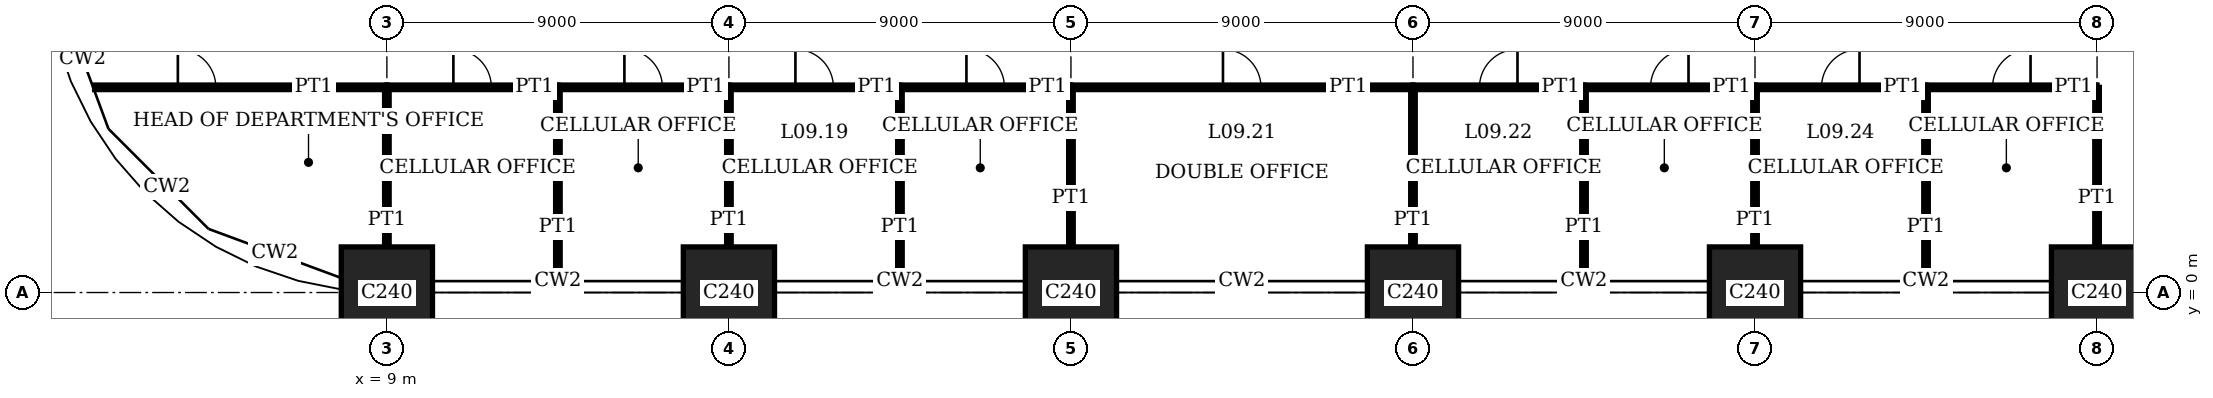
"""IFC4 building model, lengths in metres.
Left out: names, types, materials, properties, quantities, classifications, styles, units other than length and angle.
Written with IfcOpenShell. Run it as: python <this file> out.ifc"""

import sys

from ifc_helpers import new_model, si_unit, direction, frame, frame_2d, origin, origin_2d, place, context, subcontext, project, spatial, rectangle, extrude, element, fill, save


model = new_model("IFC4")
c1 = context("Model", 3, precision=1e-05, world=origin(), true_north=direction((0.0, 1.0)))
c2 = subcontext(c1, "Body", "Model", "MODEL_VIEW")
j1 = project(units=[si_unit("LENGTHUNIT", "METRE"), si_unit("PLANEANGLEUNIT", "RADIAN")], contexts=[c1])
p1 = place(None, origin())
s1 = spatial("IfcSite", under=j1, at=p1, CompositionType="ELEMENT")
p2 = place(p1, origin())
s2 = spatial("IfcBuilding", under=s1, at=p2, CompositionType="ELEMENT")
p3 = place(p2, frame((0.0, 0.0, 39.8)))
s3 = spatial("IfcBuildingStorey", under=s2, at=p3, CompositionType="ELEMENT", Elevation=39.8)
for number, where, z_axis, x_axis in (
    (1, (9.0, 0.0, 0.0), (0.0, 0.0, 1.0), (1.0, 0.0, 0.0)),
    (2, (18.0, 0.0, 0.0), (0.0, 0.0, 1.0), (1.0, 0.0, 0.0)),
    (3, (27.0, 0.0, 0.0), (0.0, 0.0, 1.0), (1.0, 0.0, 0.0)),
    (4, (36.0, 0.0, 0.0), (0.0, 0.0, 1.0), (1.0, 0.0, 0.0)),
    (5, (45.0, 0.0, 0.0), (0.0, 0.0, 1.0), (1.0, 0.0, 0.0)),
    (6, (54.0, 0.0, 0.0), (0.0, 0.0, 1.0), (1.0, 0.0, 0.0)),
):
    element("IfcColumn", number, at=place(p3, frame(where, z_axis=z_axis, x_axis=x_axis)), inside=s3, PredefinedType="COLUMN", context=c2, shape_type="SweptSolid", body=[
        extrude(rectangle(XDim=2.4, YDim=2.4, at=origin_2d()), origin(), (0.0, 0.0, 1.0), 4.0),
    ])
p4 = place(p3, frame((9.0, 5.4, 0.0), z_axis=(0.0, 0.0, 1.0), x_axis=(1.0, 0.0, 0.0)))
e7 = element("IfcWall", 7, at=p4, inside=s3, PredefinedType="PARTITIONING", context=c2, shape_type="SweptSolid", body=[
    extrude(rectangle(XDim=4.5, YDim=0.12, at=frame_2d((2.25, 0.0))), origin(), (0.0, 0.0, 1.0), 3.75),
])
p5 = place(p4, frame((1.75, 0.0, 0.0)))
e8 = element("IfcOpeningElement", 8, at=p5, cuts=e7, PredefinedType="OPENING", context=c2, shape_type="SweptSolid", body=[
    extrude(rectangle(XDim=1.0, YDim=2.4, at=frame_2d((0.5, 1.2))), frame((0.0, 0.07, 0.0), z_axis=(0.0, -1.0, 0.0), x_axis=(1.0, 0.0, 0.0)), (0.0, 0.0, 1.0), 0.14),
])
p6 = place(p3, frame((13.5, 5.4, 0.0), z_axis=(0.0, 0.0, 1.0), x_axis=(1.0, 0.0, 0.0)))
e9 = element("IfcWall", 9, at=p6, inside=s3, PredefinedType="PARTITIONING", context=c2, shape_type="SweptSolid", body=[
    extrude(rectangle(XDim=4.5, YDim=0.12, at=frame_2d((2.25, 0.0))), origin(), (0.0, 0.0, 1.0), 3.75),
])
p7 = place(p6, frame((1.75, 0.0, 0.0)))
e10 = element("IfcOpeningElement", 10, at=p7, cuts=e9, PredefinedType="OPENING", context=c2, shape_type="SweptSolid", body=[
    extrude(rectangle(XDim=1.0, YDim=2.4, at=frame_2d((0.5, 1.2))), frame((0.0, 0.07, 0.0), z_axis=(0.0, -1.0, 0.0), x_axis=(1.0, 0.0, 0.0)), (0.0, 0.0, 1.0), 0.14),
])
p8 = place(p3, frame((18.0, 5.4, 0.0), z_axis=(0.0, 0.0, 1.0), x_axis=(1.0, 0.0, 0.0)))
e11 = element("IfcWall", 11, at=p8, inside=s3, PredefinedType="PARTITIONING", context=c2, shape_type="SweptSolid", body=[
    extrude(rectangle(XDim=4.5, YDim=0.12, at=frame_2d((2.25, 0.0))), origin(), (0.0, 0.0, 1.0), 3.75),
])
p9 = place(p8, frame((1.75, 0.0, 0.0)))
e12 = element("IfcOpeningElement", 12, at=p9, cuts=e11, PredefinedType="OPENING", context=c2, shape_type="SweptSolid", body=[
    extrude(rectangle(XDim=1.0, YDim=2.4, at=frame_2d((0.5, 1.2))), frame((0.0, 0.07, 0.0), z_axis=(0.0, -1.0, 0.0), x_axis=(1.0, 0.0, 0.0)), (0.0, 0.0, 1.0), 0.14),
])
p10 = place(p3, frame((22.5, 5.4, 0.0), z_axis=(0.0, 0.0, 1.0), x_axis=(1.0, 0.0, 0.0)))
e13 = element("IfcWall", 13, at=p10, inside=s3, PredefinedType="PARTITIONING", context=c2, shape_type="SweptSolid", body=[
    extrude(rectangle(XDim=4.5, YDim=0.12, at=frame_2d((2.25, 0.0))), origin(), (0.0, 0.0, 1.0), 3.75),
])
p11 = place(p10, frame((1.75, 0.0, 0.0)))
e14 = element("IfcOpeningElement", 14, at=p11, cuts=e13, PredefinedType="OPENING", context=c2, shape_type="SweptSolid", body=[
    extrude(rectangle(XDim=1.0, YDim=2.4, at=frame_2d((0.5, 1.2))), frame((0.0, 0.07, 0.0), z_axis=(0.0, -1.0, 0.0), x_axis=(1.0, 0.0, 0.0)), (0.0, 0.0, 1.0), 0.14),
])
p12 = place(p3, frame((27.0, 5.4, 0.0), z_axis=(0.0, 0.0, 1.0), x_axis=(1.0, 0.0, 0.0)))
e15 = element("IfcWall", 15, at=p12, inside=s3, PredefinedType="PARTITIONING", context=c2, shape_type="SweptSolid", body=[
    extrude(rectangle(XDim=9.0, YDim=0.12, at=frame_2d((4.5, 0.0))), origin(), (0.0, 0.0, 1.0), 3.75),
])
p13 = place(p12, frame((4.0, 0.0, 0.0)))
e16 = element("IfcOpeningElement", 16, at=p13, cuts=e15, PredefinedType="OPENING", context=c2, shape_type="SweptSolid", body=[
    extrude(rectangle(XDim=1.0, YDim=2.4, at=frame_2d((0.5, 1.2))), frame((0.0, 0.07, 0.0), z_axis=(0.0, -1.0, 0.0), x_axis=(1.0, 0.0, 0.0)), (0.0, 0.0, 1.0), 0.14),
])
p14 = place(p3, frame((36.0, 5.4, 0.0), z_axis=(0.0, 0.0, 1.0), x_axis=(1.0, 0.0, 0.0)))
e17 = element("IfcWall", 17, at=p14, inside=s3, PredefinedType="PARTITIONING", context=c2, shape_type="SweptSolid", body=[
    extrude(rectangle(XDim=4.5, YDim=0.12, at=frame_2d((2.25, 0.0))), origin(), (0.0, 0.0, 1.0), 3.75),
])
p15 = place(p14, frame((1.75, 0.0, 0.0)))
e18 = element("IfcOpeningElement", 18, at=p15, cuts=e17, PredefinedType="OPENING", context=c2, shape_type="SweptSolid", body=[
    extrude(rectangle(XDim=1.0, YDim=2.4, at=frame_2d((0.5, 1.2))), frame((0.0, 0.07, 0.0), z_axis=(0.0, -1.0, 0.0), x_axis=(1.0, 0.0, 0.0)), (0.0, 0.0, 1.0), 0.14),
])
p16 = place(p3, frame((40.5, 5.4, 0.0), z_axis=(0.0, 0.0, 1.0), x_axis=(1.0, 0.0, 0.0)))
e19 = element("IfcWall", 19, at=p16, inside=s3, PredefinedType="PARTITIONING", context=c2, shape_type="SweptSolid", body=[
    extrude(rectangle(XDim=4.5, YDim=0.12, at=frame_2d((2.25, 0.0))), origin(), (0.0, 0.0, 1.0), 3.75),
])
p17 = place(p16, frame((1.75, 0.0, 0.0)))
e20 = element("IfcOpeningElement", 20, at=p17, cuts=e19, PredefinedType="OPENING", context=c2, shape_type="SweptSolid", body=[
    extrude(rectangle(XDim=1.0, YDim=2.4, at=frame_2d((0.5, 1.2))), frame((0.0, 0.07, 0.0), z_axis=(0.0, -1.0, 0.0), x_axis=(1.0, 0.0, 0.0)), (0.0, 0.0, 1.0), 0.14),
])
p18 = place(p3, frame((45.0, 5.4, 0.0), z_axis=(0.0, 0.0, 1.0), x_axis=(1.0, 0.0, 0.0)))
e21 = element("IfcWall", 21, at=p18, inside=s3, PredefinedType="PARTITIONING", context=c2, shape_type="SweptSolid", body=[
    extrude(rectangle(XDim=4.5, YDim=0.12, at=frame_2d((2.25, 0.0))), origin(), (0.0, 0.0, 1.0), 3.75),
])
p19 = place(p18, frame((1.75, 0.0, 0.0)))
e22 = element("IfcOpeningElement", 22, at=p19, cuts=e21, PredefinedType="OPENING", context=c2, shape_type="SweptSolid", body=[
    extrude(rectangle(XDim=1.0, YDim=2.4, at=frame_2d((0.5, 1.2))), frame((0.0, 0.07, 0.0), z_axis=(0.0, -1.0, 0.0), x_axis=(1.0, 0.0, 0.0)), (0.0, 0.0, 1.0), 0.14),
])
p20 = place(p3, frame((49.5, 5.4, 0.0), z_axis=(0.0, 0.0, 1.0), x_axis=(1.0, 0.0, 0.0)))
e23 = element("IfcWall", 23, at=p20, inside=s3, PredefinedType="PARTITIONING", context=c2, shape_type="SweptSolid", body=[
    extrude(rectangle(XDim=4.5, YDim=0.12, at=frame_2d((2.25, 0.0))), origin(), (0.0, 0.0, 1.0), 3.75),
])
p21 = place(p20, frame((1.75, 0.0, 0.0)))
e24 = element("IfcOpeningElement", 24, at=p21, cuts=e23, PredefinedType="OPENING", context=c2, shape_type="SweptSolid", body=[
    extrude(rectangle(XDim=1.0, YDim=2.4, at=frame_2d((0.5, 1.2))), frame((0.0, 0.07, 0.0), z_axis=(0.0, -1.0, 0.0), x_axis=(1.0, 0.0, 0.0)), (0.0, 0.0, 1.0), 0.14),
])
p22 = place(p3, frame((1.31, 5.4, 0.0), z_axis=(0.0, 0.0, 1.0), x_axis=(1.0, 0.0, 0.0)))
e25 = element("IfcWall", 25, at=p22, inside=s3, PredefinedType="PARTITIONING", context=c2, shape_type="SweptSolid", body=[
    extrude(rectangle(XDim=7.69, YDim=0.12, at=frame_2d((3.845, 0.0))), origin(), (0.0, 0.0, 1.0), 3.75),
])
p23 = place(p22, frame((2.19, 0.0, 0.0)))
e26 = element("IfcOpeningElement", 26, at=p23, cuts=e25, PredefinedType="OPENING", context=c2, shape_type="SweptSolid", body=[
    extrude(rectangle(XDim=1.0, YDim=2.4, at=frame_2d((0.5, 1.2))), frame((0.0, 0.07, 0.0), z_axis=(0.0, -1.0, 0.0), x_axis=(1.0, 0.0, 0.0)), (0.0, 0.0, 1.0), 0.14),
])
p24 = place(p3, frame((9.0, 1.2, 0.0), z_axis=(0.0, 0.0, 1.0), x_axis=(0.0, 1.0, 0.0)))
e27 = element("IfcWall", 27, at=p24, inside=s3, PredefinedType="PARTITIONING", context=c2, shape_type="SweptSolid", body=[
    extrude(rectangle(XDim=4.2, YDim=0.12, at=frame_2d((2.1, 0.0))), origin(), (0.0, 0.0, 1.0), 3.05),
])
p25 = place(p3, frame((13.5, 0.31, 0.0), z_axis=(0.0, 0.0, 1.0), x_axis=(0.0, 1.0, 0.0)))
e28 = element("IfcWall", 28, at=p25, inside=s3, PredefinedType="PARTITIONING", context=c2, shape_type="SweptSolid", body=[
    extrude(rectangle(XDim=5.09, YDim=0.12, at=frame_2d((2.545, 0.0))), origin(), (0.0, 0.0, 1.0), 3.75),
])
p26 = place(p3, frame((18.0, 1.2, 0.0), z_axis=(0.0, 0.0, 1.0), x_axis=(0.0, 1.0, 0.0)))
e29 = element("IfcWall", 29, at=p26, inside=s3, PredefinedType="PARTITIONING", context=c2, shape_type="SweptSolid", body=[
    extrude(rectangle(XDim=4.2, YDim=0.12, at=frame_2d((2.1, 0.0))), origin(), (0.0, 0.0, 1.0), 3.05),
])
p27 = place(p3, frame((22.5, 0.31, 0.0), z_axis=(0.0, 0.0, 1.0), x_axis=(0.0, 1.0, 0.0)))
e30 = element("IfcWall", 30, at=p27, inside=s3, PredefinedType="PARTITIONING", context=c2, shape_type="SweptSolid", body=[
    extrude(rectangle(XDim=5.09, YDim=0.12, at=frame_2d((2.545, 0.0))), origin(), (0.0, 0.0, 1.0), 3.75),
])
for number, where, z_axis, x_axis in (
    (31, (27.0, 1.2, 0.0), (0.0, 0.0, 1.0), (0.0, 1.0, 0.0)),
    (32, (36.0, 1.2, 0.0), (0.0, 0.0, 1.0), (0.0, 1.0, 0.0)),
):
    element("IfcWall", number, at=place(p3, frame(where, z_axis=z_axis, x_axis=x_axis)), inside=s3, PredefinedType="PARTITIONING", context=c2, shape_type="SweptSolid", body=[
        extrude(rectangle(XDim=4.2, YDim=0.12, at=frame_2d((2.1, 0.0))), origin(), (0.0, 0.0, 1.0), 3.05),
    ])
p28 = place(p3, frame((40.5, 0.31, 0.0), z_axis=(0.0, 0.0, 1.0), x_axis=(0.0, 1.0, 0.0)))
e33 = element("IfcWall", 33, at=p28, inside=s3, PredefinedType="PARTITIONING", context=c2, shape_type="SweptSolid", body=[
    extrude(rectangle(XDim=5.09, YDim=0.12, at=frame_2d((2.545, 0.0))), origin(), (0.0, 0.0, 1.0), 3.75),
])
p29 = place(p3, frame((45.0, 1.2, 0.0), z_axis=(0.0, 0.0, 1.0), x_axis=(0.0, 1.0, 0.0)))
e34 = element("IfcWall", 34, at=p29, inside=s3, PredefinedType="PARTITIONING", context=c2, shape_type="SweptSolid", body=[
    extrude(rectangle(XDim=4.2, YDim=0.12, at=frame_2d((2.1, 0.0))), origin(), (0.0, 0.0, 1.0), 3.05),
])
p30 = place(p3, frame((49.5, 0.31, 0.0), z_axis=(0.0, 0.0, 1.0), x_axis=(0.0, 1.0, 0.0)))
e35 = element("IfcWall", 35, at=p30, inside=s3, PredefinedType="PARTITIONING", context=c2, shape_type="SweptSolid", body=[
    extrude(rectangle(XDim=5.09, YDim=0.12, at=frame_2d((2.545, 0.0))), origin(), (0.0, 0.0, 1.0), 3.75),
])
p31 = place(p3, frame((54.0, 1.2, 0.0), z_axis=(0.0, 0.0, 1.0), x_axis=(0.0, 1.0, 0.0)))
e36 = element("IfcWall", 36, at=p31, inside=s3, PredefinedType="PARTITIONING", context=c2, shape_type="SweptSolid", body=[
    extrude(rectangle(XDim=4.2, YDim=0.12, at=frame_2d((2.1, 0.0))), origin(), (0.0, 0.0, 1.0), 3.05),
])
p32 = place(p5, origin())
e37 = element("IfcDoor", 37, at=p32, inside=s3, OperationType="SINGLE_SWING_RIGHT", PredefinedType="DOOR", context=c2, shape_type="SweptSolid", body=[
    extrude(rectangle(XDim=1.0, YDim=2.4, at=frame_2d((0.5, 1.2))), frame((0.0, 0.025, 0.0), z_axis=(0.0, -1.0, 0.0), x_axis=(1.0, 0.0, 0.0)), (0.0, 0.0, 1.0), 0.05),
])
fill(e8, e37)
p33 = place(p7, origin())
e38 = element("IfcDoor", 38, at=p33, inside=s3, OperationType="SINGLE_SWING_RIGHT", PredefinedType="DOOR", context=c2, shape_type="SweptSolid", body=[
    extrude(rectangle(XDim=1.0, YDim=2.4, at=frame_2d((0.5, 1.2))), frame((0.0, 0.025, 0.0), z_axis=(0.0, -1.0, 0.0), x_axis=(1.0, 0.0, 0.0)), (0.0, 0.0, 1.0), 0.05),
])
fill(e10, e38)
p34 = place(p9, origin())
e39 = element("IfcDoor", 39, at=p34, inside=s3, OperationType="SINGLE_SWING_RIGHT", PredefinedType="DOOR", context=c2, shape_type="SweptSolid", body=[
    extrude(rectangle(XDim=1.0, YDim=2.4, at=frame_2d((0.5, 1.2))), frame((0.0, 0.025, 0.0), z_axis=(0.0, -1.0, 0.0), x_axis=(1.0, 0.0, 0.0)), (0.0, 0.0, 1.0), 0.05),
])
fill(e12, e39)
p35 = place(p11, origin())
e40 = element("IfcDoor", 40, at=p35, inside=s3, OperationType="SINGLE_SWING_RIGHT", PredefinedType="DOOR", context=c2, shape_type="SweptSolid", body=[
    extrude(rectangle(XDim=1.0, YDim=2.4, at=frame_2d((0.5, 1.2))), frame((0.0, 0.025, 0.0), z_axis=(0.0, -1.0, 0.0), x_axis=(1.0, 0.0, 0.0)), (0.0, 0.0, 1.0), 0.05),
])
fill(e14, e40)
p36 = place(p13, origin())
e41 = element("IfcDoor", 41, at=p36, inside=s3, OperationType="SINGLE_SWING_RIGHT", PredefinedType="DOOR", context=c2, shape_type="SweptSolid", body=[
    extrude(rectangle(XDim=1.0, YDim=2.4, at=frame_2d((0.5, 1.2))), frame((0.0, 0.025, 0.0), z_axis=(0.0, -1.0, 0.0), x_axis=(1.0, 0.0, 0.0)), (0.0, 0.0, 1.0), 0.05),
])
fill(e16, e41)
p37 = place(p15, origin())
e42 = element("IfcDoor", 42, at=p37, inside=s3, OperationType="SINGLE_SWING_LEFT", PredefinedType="DOOR", context=c2, shape_type="SweptSolid", body=[
    extrude(rectangle(XDim=1.0, YDim=2.4, at=frame_2d((0.5, 1.2))), frame((0.0, 0.025, 0.0), z_axis=(0.0, -1.0, 0.0), x_axis=(1.0, 0.0, 0.0)), (0.0, 0.0, 1.0), 0.05),
])
fill(e18, e42)
p38 = place(p17, origin())
e43 = element("IfcDoor", 43, at=p38, inside=s3, OperationType="SINGLE_SWING_LEFT", PredefinedType="DOOR", context=c2, shape_type="SweptSolid", body=[
    extrude(rectangle(XDim=1.0, YDim=2.4, at=frame_2d((0.5, 1.2))), frame((0.0, 0.025, 0.0), z_axis=(0.0, -1.0, 0.0), x_axis=(1.0, 0.0, 0.0)), (0.0, 0.0, 1.0), 0.05),
])
fill(e20, e43)
p39 = place(p19, origin())
e44 = element("IfcDoor", 44, at=p39, inside=s3, OperationType="SINGLE_SWING_LEFT", PredefinedType="DOOR", context=c2, shape_type="SweptSolid", body=[
    extrude(rectangle(XDim=1.0, YDim=2.4, at=frame_2d((0.5, 1.2))), frame((0.0, 0.025, 0.0), z_axis=(0.0, -1.0, 0.0), x_axis=(1.0, 0.0, 0.0)), (0.0, 0.0, 1.0), 0.05),
])
fill(e22, e44)
p40 = place(p21, origin())
e45 = element("IfcDoor", 45, at=p40, inside=s3, OperationType="SINGLE_SWING_LEFT", PredefinedType="DOOR", context=c2, shape_type="SweptSolid", body=[
    extrude(rectangle(XDim=1.0, YDim=2.4, at=frame_2d((0.5, 1.2))), frame((0.0, 0.025, 0.0), z_axis=(0.0, -1.0, 0.0), x_axis=(1.0, 0.0, 0.0)), (0.0, 0.0, 1.0), 0.05),
])
fill(e24, e45)
p41 = place(p23, origin())
e46 = element("IfcDoor", 46, at=p41, inside=s3, OperationType="SINGLE_SWING_RIGHT", PredefinedType="DOOR", context=c2, shape_type="SweptSolid", body=[
    extrude(rectangle(XDim=1.0, YDim=2.4, at=frame_2d((0.5, 1.2))), frame((0.0, 0.025, 0.0), z_axis=(0.0, -1.0, 0.0), x_axis=(1.0, 0.0, 0.0)), (0.0, 0.0, 1.0), 0.05),
])
fill(e26, e46)
save(model, sys.argv[1])
